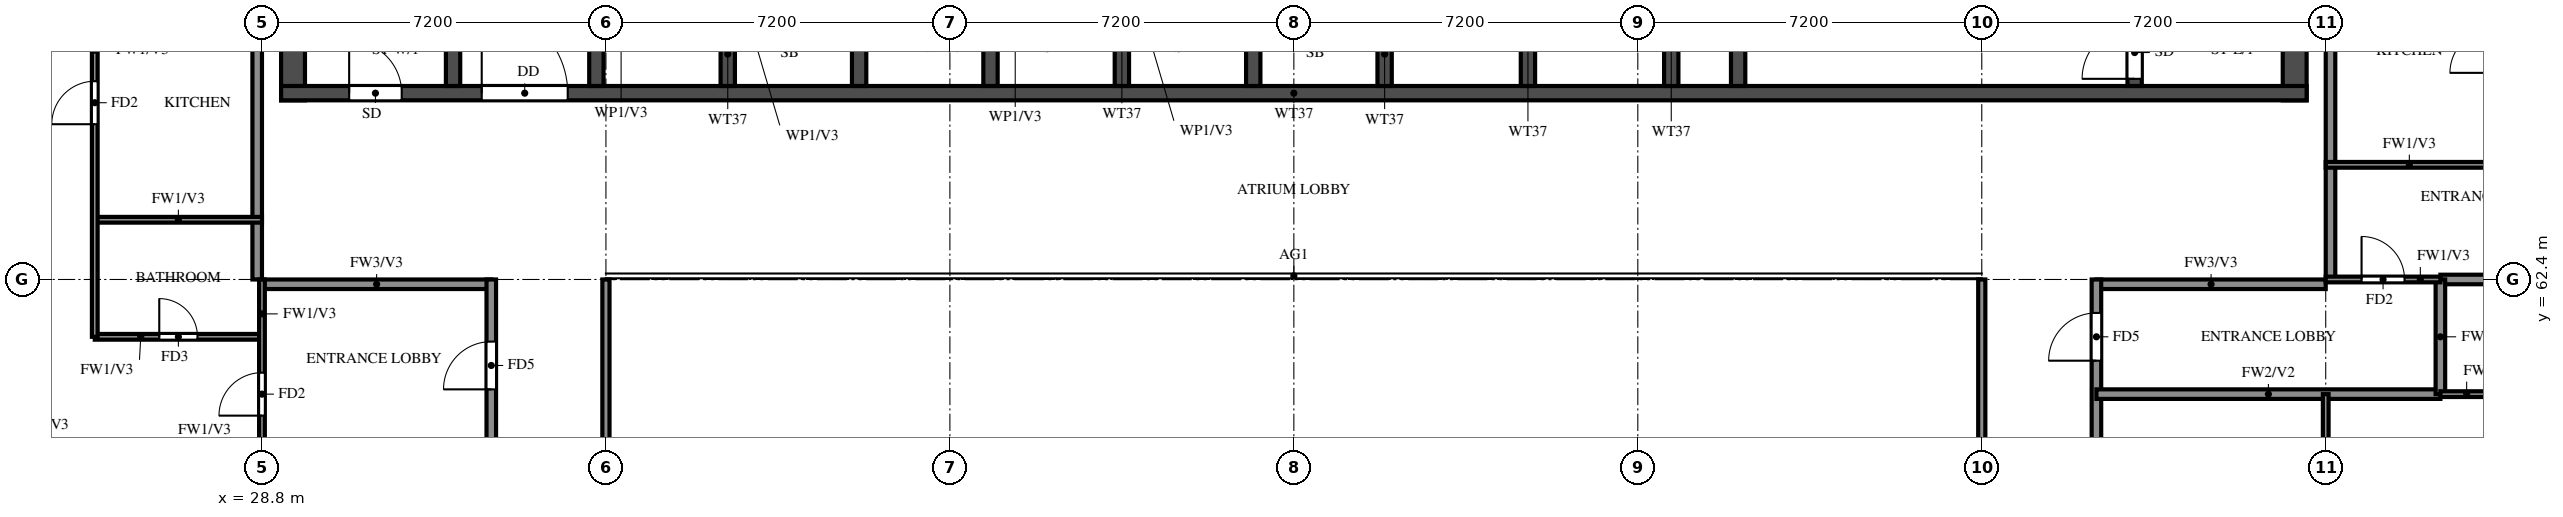
"""IFC4 building model, lengths in metres.
Left out: names, types, materials, properties, quantities, classifications, styles, units other than length and angle.
Written with IfcOpenShell. Run it as: python <this file> out.ifc"""

import sys

from ifc_helpers import new_model, si_unit, direction, frame, frame_2d, origin, place, context, subcontext, project, spatial, rectangle, extrude, element, fill, save


model = new_model("IFC4")
c1 = context("Model", 3, precision=1e-05, world=origin(), true_north=direction((0.0, 1.0)))
c2 = subcontext(c1, "Body", "Model", "MODEL_VIEW")
j1 = project(units=[si_unit("LENGTHUNIT", "METRE"), si_unit("PLANEANGLEUNIT", "RADIAN")], contexts=[c1])
p1 = place(None, origin())
s1 = spatial("IfcSite", under=j1, at=p1, CompositionType="ELEMENT")
p2 = place(p1, origin())
s2 = spatial("IfcBuilding", under=s1, at=p2, CompositionType="ELEMENT")
p3 = place(p2, frame((0.0, 0.0, 232.5)))
s3 = spatial("IfcBuildingStorey", under=s2, at=p3, CompositionType="ELEMENT", Elevation=232.5)
for number, where, z_axis, x_axis in (
    (1, (29.45, 66.15, 0.0), (0.0, 0.0, 1.0), (0.0, 1.0, 0.0)),
    (2, (71.35, 66.15, 0.0), (0.0, 0.0, 1.0), (0.0, 1.0, 0.0)),
):
    element("IfcWall", number, at=place(p3, frame(where, z_axis=z_axis, x_axis=x_axis)), inside=s3, PredefinedType="SHEAR", context=c2, shape_type="SweptSolid", body=[
        extrude(rectangle(XDim=11.85, YDim=0.5, at=frame_2d((5.925, 0.0))), origin(), (0.0, 0.0, 1.0), 3.22),
    ])
p4 = place(p3, frame((29.2, 66.3, 0.0), z_axis=(0.0, 0.0, 1.0), x_axis=(1.0, 0.0, 0.0)))
e3 = element("IfcWall", 3, at=p4, inside=s3, PredefinedType="SHEAR", context=c2, shape_type="SweptSolid", body=[
    extrude(rectangle(XDim=42.4, YDim=0.3, at=frame_2d((21.2, 0.0))), origin(), (0.0, 0.0, 1.0), 3.22),
])
p5 = place(p4, frame((1.425, 0.0, 0.0)))
e4 = element("IfcOpeningElement", 4, at=p5, cuts=e3, PredefinedType="OPENING", context=c2, shape_type="SweptSolid", body=[
    extrude(rectangle(XDim=1.1, YDim=2.1, at=frame_2d((0.55, 1.05))), frame((0.0, 0.16, 0.0), z_axis=(0.0, -1.0, 0.0), x_axis=(1.0, 0.0, 0.0)), (0.0, 0.0, 1.0), 0.32),
])
p6 = place(p4, frame((4.2, 0.0, 0.0)))
e5 = element("IfcOpeningElement", 5, at=p6, cuts=e3, PredefinedType="OPENING", context=c2, shape_type="SweptSolid", body=[
    extrude(rectangle(XDim=1.8, YDim=2.1, at=frame_2d((0.9, 1.05))), frame((0.0, 0.16, 0.0), z_axis=(0.0, -1.0, 0.0), x_axis=(1.0, 0.0, 0.0)), (0.0, 0.0, 1.0), 0.32),
])
p7 = place(p3, frame((32.8, 66.45, 0.0), z_axis=(0.0, 0.0, 1.0), x_axis=(0.0, 1.0, 0.0)))
e6 = element("IfcWall", 6, at=p7, inside=s3, PredefinedType="SHEAR", context=c2, shape_type="SweptSolid", body=[
    extrude(rectangle(XDim=11.05, YDim=0.3, at=frame_2d((5.525, 0.0))), origin(), (0.0, 0.0, 1.0), 3.22),
])
p8 = place(p3, frame((68.0, 66.45, 0.0), z_axis=(0.0, 0.0, 1.0), x_axis=(0.0, 1.0, 0.0)))
e7 = element("IfcWall", 7, at=p8, inside=s3, PredefinedType="SHEAR", context=c2, shape_type="SweptSolid", body=[
    extrude(rectangle(XDim=11.05, YDim=0.3, at=frame_2d((5.525, 0.0))), origin(), (0.0, 0.0, 1.0), 3.22),
])
p9 = place(p8, frame((0.15, 0.0, 0.0)))
e8 = element("IfcOpeningElement", 8, at=p9, cuts=e7, PredefinedType="OPENING", context=c2, shape_type="SweptSolid", body=[
    extrude(rectangle(XDim=1.1, YDim=2.1, at=frame_2d((0.55, 1.05))), frame((0.0, 0.16, 0.0), z_axis=(0.0, -1.0, 0.0), x_axis=(1.0, 0.0, 0.0)), (0.0, 0.0, 1.0), 0.32),
])
p10 = place(p3, frame((59.7, 66.45, 0.0), z_axis=(0.0, 0.0, 1.0), x_axis=(0.0, 1.0, 0.0)))
e9 = element("IfcWall", 9, at=p10, inside=s3, PredefinedType="SHEAR", context=c2, shape_type="SweptSolid", body=[
    extrude(rectangle(XDim=6.175, YDim=0.3, at=frame_2d((3.087, 0.0))), origin(), (0.0, 0.0, 1.0), 3.22),
])
p11 = place(p10, frame((3.85, 0.0, 0.0)))
e10 = element("IfcOpeningElement", 10, at=p11, cuts=e9, PredefinedType="OPENING", context=c2, shape_type="SweptSolid", body=[
    extrude(rectangle(XDim=1.2, YDim=2.1, at=frame_2d((0.6, 1.05))), frame((0.0, 0.16, 0.0), z_axis=(0.0, -1.0, 0.0), x_axis=(1.0, 0.0, 0.0)), (0.0, 0.0, 1.0), 0.32),
])
for number, where, z_axis, x_axis in (
    (11, (35.8, 66.45, 0.0), (0.0, 0.0, 1.0), (0.0, 1.0, 0.0)),
    (12, (38.55, 66.45, 0.0), (0.0, 0.0, 1.0), (0.0, 1.0, 0.0)),
    (13, (41.3, 66.45, 0.0), (0.0, 0.0, 1.0), (0.0, 1.0, 0.0)),
    (14, (44.05, 66.45, 0.0), (0.0, 0.0, 1.0), (0.0, 1.0, 0.0)),
    (15, (46.8, 66.45, 0.0), (0.0, 0.0, 1.0), (0.0, 1.0, 0.0)),
    (16, (49.55, 66.45, 0.0), (0.0, 0.0, 1.0), (0.0, 1.0, 0.0)),
    (17, (52.3, 66.45, 0.0), (0.0, 0.0, 1.0), (0.0, 1.0, 0.0)),
    (18, (55.3, 66.45, 0.0), (0.0, 0.0, 1.0), (0.0, 1.0, 0.0)),
    (19, (58.3, 66.45, 0.0), (0.0, 0.0, 1.0), (0.0, 1.0, 0.0)),
):
    element("IfcWall", number, at=place(p3, frame(where, z_axis=z_axis, x_axis=x_axis)), inside=s3, PredefinedType="SHEAR", context=c2, shape_type="SweptSolid", body=[
        extrude(rectangle(XDim=2.425, YDim=0.3, at=frame_2d((1.212, 0.0))), origin(), (0.0, 0.0, 1.0), 3.22),
    ])
for number, where, z_axis, x_axis in (
    (20, (28.8, 62.3, 0.0), (0.0, 0.0, 1.0), (1.0, 0.0, 0.0)),
    (21, (67.2, 62.3, 0.0), (0.0, 0.0, 1.0), (1.0, 0.0, 0.0)),
):
    element("IfcWall", number, at=place(p3, frame(where, z_axis=z_axis, x_axis=x_axis)), inside=s3, PredefinedType="SOLIDWALL", context=c2, shape_type="SweptSolid", body=[
        extrude(rectangle(XDim=4.8, YDim=0.2, at=frame_2d((2.4, 0.0))), origin(), (0.0, 0.0, 1.0), 3.22),
    ])
p12 = place(p3, frame((28.7, 62.4, 0.0), z_axis=(0.0, 0.0, 1.0), x_axis=(0.0, 1.0, 0.0)))
e22 = element("IfcWall", 22, at=p12, inside=s3, PredefinedType="SOLIDWALL", context=c2, shape_type="SweptSolid", body=[
    extrude(rectangle(XDim=15.6, YDim=0.2, at=frame_2d((7.8, 0.0))), origin(), (0.0, 0.0, 1.0), 3.22),
])
p13 = place(p3, frame((33.6, 50.4, 0.0), z_axis=(0.0, 0.0, 1.0), x_axis=(0.0, 1.0, 0.0)))
e23 = element("IfcWall", 23, at=p13, inside=s3, PredefinedType="SOLIDWALL", context=c2, shape_type="SweptSolid", body=[
    extrude(rectangle(XDim=12.0, YDim=0.2, at=frame_2d((6.0, 0.0))), origin(), (0.0, 0.0, 1.0), 3.22),
])
p14 = place(p13, frame((0.7, 0.0, 0.0)))
e24 = element("IfcOpeningElement", 24, at=p14, cuts=e23, PredefinedType="OPENING", context=c2, shape_type="SweptSolid", body=[
    extrude(rectangle(XDim=1.0, YDim=2.1, at=frame_2d((0.5, 1.05))), frame((0.0, 0.11, 0.0), z_axis=(0.0, -1.0, 0.0), x_axis=(1.0, 0.0, 0.0)), (0.0, 0.0, 1.0), 0.22),
])
p15 = place(p13, frame((9.7, 0.0, 0.0)))
e25 = element("IfcOpeningElement", 25, at=p15, cuts=e23, PredefinedType="OPENING", context=c2, shape_type="SweptSolid", body=[
    extrude(rectangle(XDim=1.0, YDim=2.1, at=frame_2d((0.5, 1.05))), frame((0.0, 0.11, 0.0), z_axis=(0.0, -1.0, 0.0), x_axis=(1.0, 0.0, 0.0)), (0.0, 0.0, 1.0), 0.22),
])
p16 = place(p3, frame((67.2, 45.6, 0.0), z_axis=(0.0, 0.0, 1.0), x_axis=(0.0, 1.0, 0.0)))
e26 = element("IfcWall", 26, at=p16, inside=s3, PredefinedType="SOLIDWALL", context=c2, shape_type="SweptSolid", body=[
    extrude(rectangle(XDim=16.8, YDim=0.2, at=frame_2d((8.4, 0.0))), origin(), (0.0, 0.0, 1.0), 3.22),
])
p17 = place(p16, frame((6.7, 0.0, 0.0)))
e27 = element("IfcOpeningElement", 27, at=p17, cuts=e26, PredefinedType="OPENING", context=c2, shape_type="SweptSolid", body=[
    extrude(rectangle(XDim=1.0, YDim=2.1, at=frame_2d((0.5, 1.05))), frame((0.0, 0.11, 0.0), z_axis=(0.0, -1.0, 0.0), x_axis=(1.0, 0.0, 0.0)), (0.0, 0.0, 1.0), 0.22),
])
p18 = place(p16, frame((15.1, 0.0, 0.0)))
e28 = element("IfcOpeningElement", 28, at=p18, cuts=e26, PredefinedType="OPENING", context=c2, shape_type="SweptSolid", body=[
    extrude(rectangle(XDim=1.0, YDim=2.1, at=frame_2d((0.5, 1.05))), frame((0.0, 0.11, 0.0), z_axis=(0.0, -1.0, 0.0), x_axis=(1.0, 0.0, 0.0)), (0.0, 0.0, 1.0), 0.22),
])
p19 = place(p16, frame((0.7, 0.0, 0.0)))
e29 = element("IfcOpeningElement", 29, at=p19, cuts=e26, PredefinedType="OPENING", context=c2, shape_type="SweptSolid", body=[
    extrude(rectangle(XDim=1.0, YDim=2.1, at=frame_2d((0.5, 1.05))), frame((0.0, 0.11, 0.0), z_axis=(0.0, -1.0, 0.0), x_axis=(1.0, 0.0, 0.0)), (0.0, 0.0, 1.0), 0.22),
])
p20 = place(p3, frame((72.1, 62.4, 0.0), z_axis=(0.0, 0.0, 1.0), x_axis=(0.0, 1.0, 0.0)))
e30 = element("IfcWall", 30, at=p20, inside=s3, PredefinedType="SOLIDWALL", context=c2, shape_type="SweptSolid", body=[
    extrude(rectangle(XDim=15.6, YDim=0.2, at=frame_2d((7.8, 0.0))), origin(), (0.0, 0.0, 1.0), 3.22),
])
p21 = place(p3, frame((67.2, 60.0, 0.0), z_axis=(0.0, 0.0, 1.0), x_axis=(1.0, 0.0, 0.0)))
e31 = element("IfcWall", 31, at=p21, inside=s3, PredefinedType="SOLIDWALL", context=c2, shape_type="SweptSolid", body=[
    extrude(rectangle(XDim=7.2, YDim=0.2, at=frame_2d((3.6, 0.0))), origin(), (0.0, 0.0, 1.0), 3.22),
])
p22 = place(p3, frame((74.4, 62.4, 0.0), z_axis=(0.0, 0.0, 1.0), x_axis=(1.0, 0.0, 0.0)))
e32 = element("IfcWall", 32, at=p22, inside=s3, PredefinedType="SOLIDWALL", context=c2, shape_type="SweptSolid", body=[
    extrude(rectangle(XDim=7.875, YDim=0.2, at=frame_2d((3.938, 0.0))), origin(), (0.0, 0.0, 1.0), 3.22),
])
p23 = place(p3, frame((74.4, 60.0, 0.0), z_axis=(0.0, 0.0, 1.0), x_axis=(0.0, 1.0, 0.0)))
e33 = element("IfcWall", 33, at=p23, inside=s3, PredefinedType="SOLIDWALL", context=c2, shape_type="SweptSolid", body=[
    extrude(rectangle(XDim=2.4, YDim=0.2, at=frame_2d((1.2, 0.0))), origin(), (0.0, 0.0, 1.0), 3.22),
])
p24 = place(p3, frame((74.4, 60.0, 0.0), z_axis=(0.0, 0.0, 1.0), x_axis=(1.0, 0.0, 0.0)))
e34 = element("IfcWall", 34, at=p24, inside=s3, PredefinedType="PARTITIONING", context=c2, shape_type="SweptSolid", body=[
    extrude(rectangle(XDim=1.1, YDim=0.12, at=frame_2d((0.55, 0.0))), origin(), (0.0, 0.0, 1.0), 3.22),
])
p25 = place(p3, frame((25.3, 61.2, 0.0), z_axis=(0.0, 0.0, 1.0), x_axis=(1.0, 0.0, 0.0)))
e35 = element("IfcWall", 35, at=p25, inside=s3, PredefinedType="PARTITIONING", context=c2, shape_type="SweptSolid", body=[
    extrude(rectangle(XDim=3.5, YDim=0.12, at=frame_2d((1.75, 0.0))), origin(), (0.0, 0.0, 1.0), 3.22),
])
p26 = place(p25, frame((1.35, 0.0, 0.0)))
e36 = element("IfcOpeningElement", 36, at=p26, cuts=e35, PredefinedType="OPENING", context=c2, shape_type="SweptSolid", body=[
    extrude(rectangle(XDim=0.8, YDim=2.1, at=frame_2d((0.4, 1.05))), frame((0.0, 0.07, 0.0), z_axis=(0.0, -1.0, 0.0), x_axis=(1.0, 0.0, 0.0)), (0.0, 0.0, 1.0), 0.14),
])
p27 = place(p3, frame((72.0, 62.4, 0.0), z_axis=(0.0, 0.0, 1.0), x_axis=(1.0, 0.0, 0.0)))
e37 = element("IfcWall", 37, at=p27, inside=s3, PredefinedType="PARTITIONING", context=c2, shape_type="SweptSolid", body=[
    extrude(rectangle(XDim=2.4, YDim=0.12, at=frame_2d((1.2, 0.0))), origin(), (0.0, 0.0, 1.0), 3.22),
])
p28 = place(p27, frame((0.75, 0.0, 0.0)))
e38 = element("IfcOpeningElement", 38, at=p28, cuts=e37, PredefinedType="OPENING", context=c2, shape_type="SweptSolid", body=[
    extrude(rectangle(XDim=0.9, YDim=2.1, at=frame_2d((0.45, 1.05))), frame((0.0, 0.07, 0.0), z_axis=(0.0, -1.0, 0.0), x_axis=(1.0, 0.0, 0.0)), (0.0, 0.0, 1.0), 0.14),
])
for number, where, z_axis, x_axis in (
    (39, (25.3, 63.65, 0.0), (0.0, 0.0, 1.0), (1.0, 0.0, 0.0)),
    (40, (72.0, 64.8, 0.0), (0.0, 0.0, 1.0), (1.0, 0.0, 0.0)),
):
    element("IfcWall", number, at=place(p3, frame(where, z_axis=z_axis, x_axis=x_axis)), inside=s3, PredefinedType="PARTITIONING", context=c2, shape_type="SweptSolid", body=[
        extrude(rectangle(XDim=3.5, YDim=0.12, at=frame_2d((1.75, 0.0))), origin(), (0.0, 0.0, 1.0), 3.22),
    ])
p29 = place(p3, frame((25.3, 61.2, 0.0), z_axis=(0.0, 0.0, 1.0), x_axis=(0.0, 1.0, 0.0)))
e41 = element("IfcWall", 41, at=p29, inside=s3, PredefinedType="PARTITIONING", context=c2, shape_type="SweptSolid", body=[
    extrude(rectangle(XDim=12.0, YDim=0.12, at=frame_2d((6.0, 0.0))), origin(), (0.0, 0.0, 1.0), 3.22),
])
p30 = place(p29, frame((4.45, 0.0, 0.0)))
e42 = element("IfcOpeningElement", 42, at=p30, cuts=e41, PredefinedType="OPENING", context=c2, shape_type="SweptSolid", body=[
    extrude(rectangle(XDim=0.9, YDim=2.1, at=frame_2d((0.45, 1.05))), frame((0.0, 0.07, 0.0), z_axis=(0.0, -1.0, 0.0), x_axis=(1.0, 0.0, 0.0)), (0.0, 0.0, 1.0), 0.14),
])
p31 = place(p29, frame((9.225, 0.0, 0.0)))
e43 = element("IfcOpeningElement", 43, at=p31, cuts=e41, PredefinedType="OPENING", context=c2, shape_type="SweptSolid", body=[
    extrude(rectangle(XDim=0.9, YDim=2.1, at=frame_2d((0.45, 1.05))), frame((0.0, 0.07, 0.0), z_axis=(0.0, -1.0, 0.0), x_axis=(1.0, 0.0, 0.0)), (0.0, 0.0, 1.0), 0.14),
])
p32 = place(p3, frame((28.8, 58.8, 0.0), z_axis=(0.0, 0.0, 1.0), x_axis=(0.0, 1.0, 0.0)))
e44 = element("IfcWall", 44, at=p32, inside=s3, PredefinedType="PARTITIONING", context=c2, shape_type="SweptSolid", body=[
    extrude(rectangle(XDim=3.6, YDim=0.12, at=frame_2d((1.8, 0.0))), origin(), (0.0, 0.0, 1.0), 3.22),
])
p33 = place(p32, frame((0.75, 0.0, 0.0)))
e45 = element("IfcOpeningElement", 45, at=p33, cuts=e44, PredefinedType="OPENING", context=c2, shape_type="SweptSolid", body=[
    extrude(rectangle(XDim=0.9, YDim=2.1, at=frame_2d((0.45, 1.05))), frame((0.0, 0.07, 0.0), z_axis=(0.0, -1.0, 0.0), x_axis=(1.0, 0.0, 0.0)), (0.0, 0.0, 1.0), 0.14),
])
p34 = place(p3, frame((72.0, 54.0, 0.0), z_axis=(0.0, 0.0, 1.0), x_axis=(0.0, 1.0, 0.0)))
e46 = element("IfcWall", 46, at=p34, inside=s3, PredefinedType="PARTITIONING", context=c2, shape_type="SweptSolid", body=[
    extrude(rectangle(XDim=6.0, YDim=0.12, at=frame_2d((3.0, 0.0))), origin(), (0.0, 0.0, 1.0), 3.22),
])
for number, where, z_axis, x_axis in (
    (47, (36.0, 48.0, 0.0), (0.0, 0.0, 1.0), (0.0, 1.0, 0.0)),
    (48, (64.8, 48.0, 0.0), (0.0, 0.0, 1.0), (0.0, 1.0, 0.0)),
):
    element("IfcWall", number, at=place(p3, frame(where, z_axis=z_axis, x_axis=x_axis)), inside=s3, PredefinedType="SOLIDWALL", context=c2, shape_type="SweptSolid", body=[
        extrude(rectangle(XDim=14.4, YDim=0.15, at=frame_2d((7.2, 0.0))), origin(), (0.0, 0.0, 1.0), 2.32),
    ])
p35 = place(p5, origin())
e49 = element("IfcDoor", 49, at=p35, inside=s3, OperationType="SINGLE_SWING_LEFT", PredefinedType="DOOR", context=c2, shape_type="SweptSolid", body=[
    extrude(rectangle(XDim=1.1, YDim=2.1, at=frame_2d((0.55, 1.05))), frame((0.0, 0.025, 0.0), z_axis=(0.0, -1.0, 0.0), x_axis=(1.0, 0.0, 0.0)), (0.0, 0.0, 1.0), 0.05),
])
fill(e4, e49)
p36 = place(p9, origin())
e50 = element("IfcDoor", 50, at=p36, inside=s3, OperationType="SINGLE_SWING_RIGHT", PredefinedType="DOOR", context=c2, shape_type="SweptSolid", body=[
    extrude(rectangle(XDim=1.1, YDim=2.1, at=frame_2d((0.55, 1.05))), frame((0.0, 0.025, 0.0), z_axis=(0.0, -1.0, 0.0), x_axis=(1.0, 0.0, 0.0)), (0.0, 0.0, 1.0), 0.05),
])
fill(e8, e50)
p37 = place(p6, origin())
e51 = element("IfcDoor", 51, at=p37, inside=s3, OperationType="DOUBLE_DOOR_SINGLE_SWING", PredefinedType="DOOR", context=c2, shape_type="SweptSolid", body=[
    extrude(rectangle(XDim=1.8, YDim=2.1, at=frame_2d((0.9, 1.05))), frame((0.0, 0.025, 0.0), z_axis=(0.0, -1.0, 0.0), x_axis=(1.0, 0.0, 0.0)), (0.0, 0.0, 1.0), 0.05),
])
fill(e5, e51)
p38 = place(p33, origin())
e52 = element("IfcDoor", 52, at=p38, inside=s3, OperationType="SINGLE_SWING_RIGHT", PredefinedType="DOOR", context=c2, shape_type="SweptSolid", body=[
    extrude(rectangle(XDim=0.9, YDim=2.1, at=frame_2d((0.45, 1.05))), frame((0.0, 0.025, 0.0), z_axis=(0.0, -1.0, 0.0), x_axis=(1.0, 0.0, 0.0)), (0.0, 0.0, 1.0), 0.05),
])
fill(e45, e52)
p39 = place(p15, origin())
e53 = element("IfcDoor", 53, at=p39, inside=s3, OperationType="SINGLE_SWING_LEFT", PredefinedType="DOOR", context=c2, shape_type="SweptSolid", body=[
    extrude(rectangle(XDim=1.0, YDim=2.1, at=frame_2d((0.5, 1.05))), frame((0.0, 0.025, 0.0), z_axis=(0.0, -1.0, 0.0), x_axis=(1.0, 0.0, 0.0)), (0.0, 0.0, 1.0), 0.05),
])
fill(e25, e53)
p40 = place(p26, origin())
e54 = element("IfcDoor", 54, at=p40, inside=s3, OperationType="SINGLE_SWING_LEFT", PredefinedType="DOOR", context=c2, shape_type="SweptSolid", body=[
    extrude(rectangle(XDim=0.8, YDim=2.1, at=frame_2d((0.4, 1.05))), frame((0.0, 0.025, 0.0), z_axis=(0.0, -1.0, 0.0), x_axis=(1.0, 0.0, 0.0)), (0.0, 0.0, 1.0), 0.05),
])
fill(e36, e54)
p41 = place(p30, origin())
e55 = element("IfcDoor", 55, at=p41, inside=s3, OperationType="SINGLE_SWING_LEFT", PredefinedType="DOOR", context=c2, shape_type="SweptSolid", body=[
    extrude(rectangle(XDim=0.9, YDim=2.1, at=frame_2d((0.45, 1.05))), frame((0.0, 0.025, 0.0), z_axis=(0.0, -1.0, 0.0), x_axis=(1.0, 0.0, 0.0)), (0.0, 0.0, 1.0), 0.05),
])
fill(e42, e55)
p42 = place(p28, origin())
e56 = element("IfcDoor", 56, at=p42, inside=s3, OperationType="SINGLE_SWING_LEFT", PredefinedType="DOOR", context=c2, shape_type="SweptSolid", body=[
    extrude(rectangle(XDim=0.9, YDim=2.1, at=frame_2d((0.45, 1.05))), frame((0.0, 0.025, 0.0), z_axis=(0.0, -1.0, 0.0), x_axis=(1.0, 0.0, 0.0)), (0.0, 0.0, 1.0), 0.05),
])
fill(e38, e56)
p43 = place(p18, origin())
e57 = element("IfcDoor", 57, at=p43, inside=s3, OperationType="SINGLE_SWING_LEFT", PredefinedType="DOOR", context=c2, shape_type="SweptSolid", body=[
    extrude(rectangle(XDim=1.0, YDim=2.1, at=frame_2d((0.5, 1.05))), frame((0.0, 0.025, 0.0), z_axis=(0.0, -1.0, 0.0), x_axis=(1.0, 0.0, 0.0)), (0.0, 0.0, 1.0), 0.05),
])
fill(e28, e57)
save(model, sys.argv[1])
